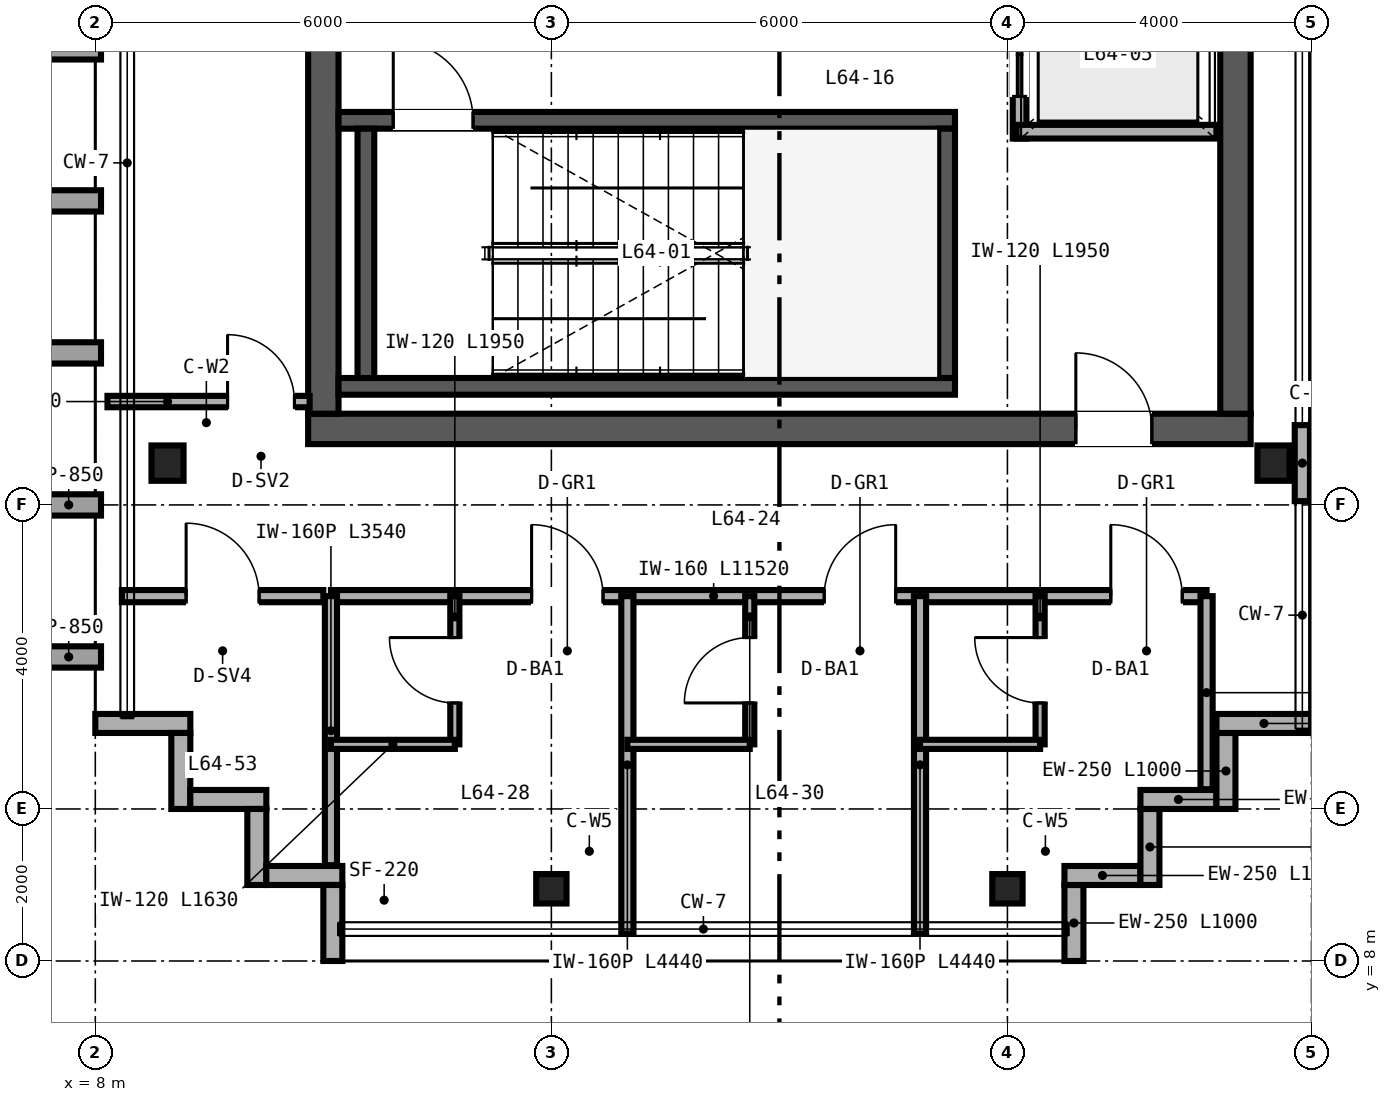
"""IFC4 building model, lengths in metres.
Left out: names, types, materials, properties, quantities, classifications, styles, units other than length and angle.
Written with IfcOpenShell. Run it as: python <this file> out.ifc"""

import sys

from ifc_helpers import new_model, si_unit, direction, frame, frame_2d, origin, origin_2d, place, context, subcontext, project, spatial, rectangle, i_section, extrude, source, transform, mapped, element, fill, save


model = new_model("IFC4")
c1 = context("Model", 3, precision=1e-05, world=origin(), true_north=direction((0.0, 1.0)))
c2 = subcontext(c1, "Body", "Model", "MODEL_VIEW")
j1 = project(units=[si_unit("LENGTHUNIT", "METRE"), si_unit("PLANEANGLEUNIT", "RADIAN")], contexts=[c1])
p1 = place(None, origin())
s1 = spatial("IfcSite", under=j1, at=p1, CompositionType="ELEMENT")
p2 = place(p1, origin())
s2 = spatial("IfcBuilding", under=s1, at=p2, CompositionType="ELEMENT")
p3 = place(p2, frame((0.0, 0.0, 254.4)))
s3 = spatial("IfcBuildingStorey", under=s2, at=p3, CompositionType="ELEMENT", Elevation=254.4)
p4 = place(p3, frame((10.8, 15.0, 0.0), z_axis=(0.0, 0.0, 1.0), x_axis=(1.0, 0.0, 0.0)))
e1 = element("IfcWall", 1, at=p4, inside=s3, PredefinedType="SHEAR", context=c2, shape_type="SweptSolid", body=[
    extrude(rectangle(XDim=12.4, YDim=0.4, at=frame_2d((6.2, 0.0))), origin(), (0.0, 0.0, 1.0), 3.38),
])
p5 = place(p4, frame((10.1, 0.0, 0.0)))
e2 = element("IfcOpeningElement", 2, at=p5, cuts=e1, PredefinedType="OPENING", context=c2, shape_type="SweptSolid", body=[
    extrude(rectangle(XDim=1.0, YDim=2.15, at=frame_2d((0.5, 1.075))), frame((0.0, 0.21, 0.0), z_axis=(0.0, -1.0, 0.0), x_axis=(1.0, 0.0, 0.0)), (0.0, 0.0, 1.0), 0.42),
])
for number, where, z_axis, x_axis in (
    (3, (11.0, 15.2, 0.0), (0.0, 0.0, 1.0), (0.0, 1.0, 0.0)),
    (4, (23.0, 15.2, 0.0), (0.0, 0.0, 1.0), (0.0, 1.0, 0.0)),
):
    element("IfcWall", number, at=place(p3, frame(where, z_axis=z_axis, x_axis=x_axis)), inside=s3, PredefinedType="SHEAR", context=c2, shape_type="SweptSolid", body=[
        extrude(rectangle(XDim=21.6, YDim=0.4, at=frame_2d((10.8, 0.0))), origin(), (0.0, 0.0, 1.0), 3.38),
    ])
p6 = place(p3, frame((11.2, 15.56, 0.0), z_axis=(0.0, 0.0, 1.0), x_axis=(1.0, 0.0, 0.0)))
e5 = element("IfcWall", 5, at=p6, inside=s3, PredefinedType="SHEAR", context=c2, shape_type="SweptSolid", body=[
    extrude(rectangle(XDim=8.11, YDim=0.22, at=frame_2d((4.055, 0.0))), origin(), (0.0, 0.0, 1.0), 3.4),
])
p7 = place(p3, frame((11.2, 19.06, 0.0), z_axis=(0.0, 0.0, 1.0), x_axis=(1.0, 0.0, 0.0)))
e6 = element("IfcWall", 6, at=p7, inside=s3, PredefinedType="SHEAR", context=c2, shape_type="SweptSolid", body=[
    extrude(rectangle(XDim=8.11, YDim=0.22, at=frame_2d((4.055, 0.0))), origin(), (0.0, 0.0, 1.0), 3.4),
])
p8 = place(p7, frame((0.72, 0.0, 0.0)))
e7 = element("IfcOpeningElement", 7, at=p8, cuts=e6, PredefinedType="OPENING", context=c2, shape_type="SweptSolid", body=[
    extrude(rectangle(XDim=1.05, YDim=2.15, at=frame_2d((0.525, 1.075))), frame((0.0, 0.12, 0.0), z_axis=(0.0, -1.0, 0.0), x_axis=(1.0, 0.0, 0.0)), (0.0, 0.0, 1.0), 0.24),
])
for number, where, z_axis, x_axis in (
    (8, (11.56, 15.67, 0.0), (0.0, 0.0, 1.0), (0.0, 1.0, 0.0)),
    (9, (19.2, 15.67, 0.0), (0.0, 0.0, 1.0), (0.0, 1.0, 0.0)),
):
    element("IfcWall", number, at=place(p3, frame(where, z_axis=z_axis, x_axis=x_axis)), inside=s3, PredefinedType="SHEAR", context=c2, shape_type="SweptSolid", body=[
        extrude(rectangle(XDim=3.28, YDim=0.22, at=frame_2d((1.64, 0.0))), origin(), (0.0, 0.0, 1.0), 3.4),
    ])
m1 = source(origin(), c2, "Body", "SweptSolid", [
    extrude(i_section(OverallWidth=0.422, OverallDepth=0.465, WebThickness=0.045, FlangeThickness=0.073, FilletRadius=0.025, at=origin_2d()), origin(), (0.0, 0.0, 1.0), 3.38),
])
for number, where, z_axis, x_axis in (
    (10, (8.95, 14.55, 0.0), (0.0, 0.0, 1.0), (1.0, 0.0, 0.0)),
    (11, (23.5, 14.55, 0.0), (0.0, 0.0, 1.0), (1.0, 0.0, 0.0)),
):
    element("IfcColumn", number, at=place(p3, frame(where, z_axis=z_axis, x_axis=x_axis)), inside=s3, PredefinedType="COLUMN", context=c2, shape_type="MappedRepresentation", body=[
        mapped(m1, transform((0.0, 0.0, 0.0), scale=1.0)),
    ])
m2 = source(origin(), c2, "Body", "SweptSolid", [
    extrude(i_section(OverallWidth=0.399, OverallDepth=0.387, WebThickness=0.021, FlangeThickness=0.033, FilletRadius=0.025, at=origin_2d()), origin(), (0.0, 0.0, 1.0), 3.38),
])
for number, where, z_axis, x_axis in (
    (12, (14.0, 8.95, 0.0), (0.0, 0.0, 1.0), (1.0, 0.0, 0.0)),
    (13, (20.0, 8.95, 0.0), (0.0, 0.0, 1.0), (1.0, 0.0, 0.0)),
):
    element("IfcColumn", number, at=place(p3, frame(where, z_axis=z_axis, x_axis=x_axis)), inside=s3, PredefinedType="COLUMN", context=c2, shape_type="MappedRepresentation", body=[
        mapped(m2, transform((0.0, 0.0, 0.0), scale=1.0)),
    ])
for number, where, z_axis, x_axis in (
    (14, (20.875, 8.0, 0.0), (0.0, 0.0, 1.0), (0.0, 1.0, 0.0)),
    (15, (20.75, 9.125, 0.0), (0.0, 0.0, 1.0), (1.0, 0.0, 0.0)),
    (16, (21.875, 9.0, 0.0), (0.0, 0.0, 1.0), (0.0, 1.0, 0.0)),
    (17, (21.75, 10.125, 0.0), (0.0, 0.0, 1.0), (1.0, 0.0, 0.0)),
    (18, (22.875, 10.0, 0.0), (0.0, 0.0, 1.0), (0.0, 1.0, 0.0)),
):
    element("IfcWall", number, at=place(p3, frame(where, z_axis=z_axis, x_axis=x_axis)), inside=s3, PredefinedType="SOLIDWALL", context=c2, shape_type="SweptSolid", body=[
        extrude(rectangle(XDim=1.0, YDim=0.25, at=frame_2d((0.5, 0.0))), origin(), (0.0, 0.0, 1.0), 3.38),
    ])
for number, where, z_axis, x_axis in (
    (19, (22.75, 11.125, 0.0), (0.0, 0.0, 1.0), (1.0, 0.0, 0.0)),
    (20, (8.0, 11.125, 0.0), (0.0, 0.0, 1.0), (1.0, 0.0, 0.0)),
):
    element("IfcWall", number, at=place(p3, frame(where, z_axis=z_axis, x_axis=x_axis)), inside=s3, PredefinedType="SOLIDWALL", context=c2, shape_type="SweptSolid", body=[
        extrude(rectangle(XDim=1.25, YDim=0.25, at=frame_2d((0.625, 0.0))), origin(), (0.0, 0.0, 1.0), 3.38),
    ])
for number, where, z_axis, x_axis in (
    (21, (9.125, 11.0, 0.0), (0.0, 0.0, 1.0), (0.0, -1.0, 0.0)),
    (22, (9.25, 10.125, 0.0), (0.0, 0.0, 1.0), (1.0, 0.0, 0.0)),
    (23, (10.125, 10.0, 0.0), (0.0, 0.0, 1.0), (0.0, -1.0, 0.0)),
    (24, (10.25, 9.125, 0.0), (0.0, 0.0, 1.0), (1.0, 0.0, 0.0)),
    (25, (11.125, 9.0, 0.0), (0.0, 0.0, 1.0), (0.0, -1.0, 0.0)),
):
    element("IfcWall", number, at=place(p3, frame(where, z_axis=z_axis, x_axis=x_axis)), inside=s3, PredefinedType="SOLIDWALL", context=c2, shape_type="SweptSolid", body=[
        extrude(rectangle(XDim=1.0, YDim=0.25, at=frame_2d((0.5, 0.0))), origin(), (0.0, 0.0, 1.0), 3.38),
    ])
p9 = place(p3, frame((23.88, 14.05, 0.0), z_axis=(0.0, 0.0, 1.0), x_axis=(0.0, 1.0, 0.0)))
e26 = element("IfcWall", 26, at=p9, inside=s3, PredefinedType="PARAPET", context=c2, shape_type="SweptSolid", body=[
    extrude(rectangle(XDim=1.0, YDim=0.2, at=frame_2d((0.5, 0.0))), origin(), (0.0, 0.0, 1.0), 3.38),
])
p10 = place(p3, frame((20.16, 18.82, 0.0), z_axis=(0.0, 0.0, 1.0), x_axis=(0.0, 1.0, 0.0)))
e27 = element("IfcWall", 27, at=p10, inside=s3, PredefinedType="SOLIDWALL", context=c2, shape_type="SweptSolid", body=[
    extrude(rectangle(XDim=6.32, YDim=0.18, at=frame_2d((3.16, 0.0))), origin(), (0.0, 0.0, 1.0), 2.48),
])
p11 = place(p10, frame((0.555, 0.0, 0.0)))
e28 = element("IfcOpeningElement", 28, at=p11, cuts=e27, PredefinedType="OPENING", context=c2, shape_type="SweptSolid", body=[
    extrude(rectangle(XDim=1.1, YDim=2.2, at=frame_2d((0.55, 1.1))), frame((0.0, 0.1, 0.0), z_axis=(0.0, -1.0, 0.0), x_axis=(1.0, 0.0, 0.0)), (0.0, 0.0, 1.0), 0.2),
])
p12 = place(p10, frame((2.635, 0.0, 0.0)))
e29 = element("IfcOpeningElement", 29, at=p12, cuts=e27, PredefinedType="OPENING", context=c2, shape_type="SweptSolid", body=[
    extrude(rectangle(XDim=1.1, YDim=2.2, at=frame_2d((0.55, 1.1))), frame((0.0, 0.1, 0.0), z_axis=(0.0, -1.0, 0.0), x_axis=(1.0, 0.0, 0.0)), (0.0, 0.0, 1.0), 0.2),
])
p13 = place(p10, frame((4.69, 0.0, 0.0)))
e30 = element("IfcOpeningElement", 30, at=p13, cuts=e27, PredefinedType="OPENING", context=c2, shape_type="SweptSolid", body=[
    extrude(rectangle(XDim=1.1, YDim=2.2, at=frame_2d((0.55, 1.1))), frame((0.0, 0.1, 0.0), z_axis=(0.0, -1.0, 0.0), x_axis=(1.0, 0.0, 0.0)), (0.0, 0.0, 1.0), 0.2),
])
p14 = place(p3, frame((20.12, 18.91, 0.0), z_axis=(0.0, 0.0, 1.0), x_axis=(1.0, 0.0, 0.0)))
e31 = element("IfcWall", 31, at=p14, inside=s3, PredefinedType="SOLIDWALL", context=c2, shape_type="SweptSolid", body=[
    extrude(rectangle(XDim=2.63, YDim=0.18, at=frame_2d((1.315, 0.0))), origin(), (0.0, 0.0, 1.0), 3.38),
])
p15 = place(p3, frame((11.1, 12.8, 0.0), z_axis=(0.0, 0.0, 1.0), x_axis=(1.0, 0.0, 0.0)))
e32 = element("IfcWall", 32, at=p15, inside=s3, PredefinedType="PARTITIONING", context=c2, shape_type="SweptSolid", body=[
    extrude(rectangle(XDim=11.52, YDim=0.16, at=frame_2d((5.76, 0.0))), origin(), (0.0, 0.0, 1.0), 3.38),
])
p16 = place(p15, frame((2.64, 0.0, 0.0)))
e33 = element("IfcOpeningElement", 33, at=p16, cuts=e32, PredefinedType="OPENING", context=c2, shape_type="SweptSolid", body=[
    extrude(rectangle(XDim=0.94, YDim=2.15, at=frame_2d((0.47, 1.075))), frame((0.0, 0.09, 0.0), z_axis=(0.0, -1.0, 0.0), x_axis=(1.0, 0.0, 0.0)), (0.0, 0.0, 1.0), 0.18),
])
p17 = place(p15, frame((6.49, 0.0, 0.0)))
e34 = element("IfcOpeningElement", 34, at=p17, cuts=e32, PredefinedType="OPENING", context=c2, shape_type="SweptSolid", body=[
    extrude(rectangle(XDim=0.94, YDim=2.15, at=frame_2d((0.47, 1.075))), frame((0.0, 0.09, 0.0), z_axis=(0.0, -1.0, 0.0), x_axis=(1.0, 0.0, 0.0)), (0.0, 0.0, 1.0), 0.18),
])
p18 = place(p15, frame((10.26, 0.0, 0.0)))
e35 = element("IfcOpeningElement", 35, at=p18, cuts=e32, PredefinedType="OPENING", context=c2, shape_type="SweptSolid", body=[
    extrude(rectangle(XDim=0.94, YDim=2.15, at=frame_2d((0.47, 1.075))), frame((0.0, 0.09, 0.0), z_axis=(0.0, -1.0, 0.0), x_axis=(1.0, 0.0, 0.0)), (0.0, 0.0, 1.0), 0.18),
])
p19 = place(p3, frame((11.1, 9.26, 0.0), z_axis=(0.0, 0.0, 1.0), x_axis=(0.0, 1.0, 0.0)))
e36 = element("IfcWall", 36, at=p19, inside=s3, PredefinedType="PARTITIONING", context=c2, shape_type="SweptSolid", body=[
    extrude(rectangle(XDim=3.54, YDim=0.16, at=frame_2d((1.77, 0.0))), origin(), (0.0, 0.0, 1.0), 3.38),
])
p20 = place(p3, frame((22.62, 10.26, 0.0), z_axis=(0.0, 0.0, 1.0), x_axis=(0.0, 1.0, 0.0)))
e37 = element("IfcWall", 37, at=p20, inside=s3, PredefinedType="PARTITIONING", context=c2, shape_type="SweptSolid", body=[
    extrude(rectangle(XDim=2.54, YDim=0.16, at=frame_2d((1.27, 0.0))), origin(), (0.0, 0.0, 1.0), 3.38),
])
p21 = place(p3, frame((15.0, 8.36, 0.0), z_axis=(0.0, 0.0, 1.0), x_axis=(0.0, 1.0, 0.0)))
e38 = element("IfcWall", 38, at=p21, inside=s3, PredefinedType="PARTITIONING", context=c2, shape_type="SweptSolid", body=[
    extrude(rectangle(XDim=4.44, YDim=0.16, at=frame_2d((2.22, 0.0))), origin(), (0.0, 0.0, 1.0), 2.687),
])
p22 = place(p3, frame((12.73, 10.85, 0.0), z_axis=(0.0, 0.0, 1.0), x_axis=(0.0, 1.0, 0.0)))
e39 = element("IfcWall", 39, at=p22, inside=s3, PredefinedType="PARTITIONING", context=c2, shape_type="SweptSolid", body=[
    extrude(rectangle(XDim=1.95, YDim=0.12, at=frame_2d((0.975, 0.0))), origin(), (0.0, 0.0, 1.0), 3.38),
])
p23 = place(p22, frame((0.545, 0.0, 0.0)))
e40 = element("IfcOpeningElement", 40, at=p23, cuts=e39, PredefinedType="OPENING", context=c2, shape_type="SweptSolid", body=[
    extrude(rectangle(XDim=0.86, YDim=2.1, at=frame_2d((0.43, 1.05))), frame((0.0, 0.07, 0.0), z_axis=(0.0, -1.0, 0.0), x_axis=(1.0, 0.0, 0.0)), (0.0, 0.0, 1.0), 0.14),
])
p24 = place(p3, frame((11.1, 10.85, 0.0), z_axis=(0.0, 0.0, 1.0), x_axis=(1.0, 0.0, 0.0)))
e41 = element("IfcWall", 41, at=p24, inside=s3, PredefinedType="PARTITIONING", context=c2, shape_type="SweptSolid", body=[
    extrude(rectangle(XDim=1.63, YDim=0.12, at=frame_2d((0.815, 0.0))), origin(), (0.0, 0.0, 1.0), 3.38),
])
p25 = place(p3, frame((18.85, 8.36, 0.0), z_axis=(0.0, 0.0, 1.0), x_axis=(0.0, 1.0, 0.0)))
e42 = element("IfcWall", 42, at=p25, inside=s3, PredefinedType="PARTITIONING", context=c2, shape_type="SweptSolid", body=[
    extrude(rectangle(XDim=4.44, YDim=0.16, at=frame_2d((2.22, 0.0))), origin(), (0.0, 0.0, 1.0), 2.687),
])
p26 = place(p3, frame((16.61, 10.85, 0.0), z_axis=(0.0, 0.0, 1.0), x_axis=(0.0, 1.0, 0.0)))
e43 = element("IfcWall", 43, at=p26, inside=s3, PredefinedType="PARTITIONING", context=c2, shape_type="SweptSolid", body=[
    extrude(rectangle(XDim=1.95, YDim=0.12, at=frame_2d((0.975, 0.0))), origin(), (0.0, 0.0, 1.0), 3.38),
])
p27 = place(p26, frame((0.545, 0.0, 0.0)))
e44 = element("IfcOpeningElement", 44, at=p27, cuts=e43, PredefinedType="OPENING", context=c2, shape_type="SweptSolid", body=[
    extrude(rectangle(XDim=0.86, YDim=2.1, at=frame_2d((0.43, 1.05))), frame((0.0, 0.07, 0.0), z_axis=(0.0, -1.0, 0.0), x_axis=(1.0, 0.0, 0.0)), (0.0, 0.0, 1.0), 0.14),
])
p28 = place(p3, frame((15.0, 10.85, 0.0), z_axis=(0.0, 0.0, 1.0), x_axis=(1.0, 0.0, 0.0)))
e45 = element("IfcWall", 45, at=p28, inside=s3, PredefinedType="PARTITIONING", context=c2, shape_type="SweptSolid", body=[
    extrude(rectangle(XDim=1.61, YDim=0.12, at=frame_2d((0.805, 0.0))), origin(), (0.0, 0.0, 1.0), 3.38),
])
p29 = place(p3, frame((20.43, 10.85, 0.0), z_axis=(0.0, 0.0, 1.0), x_axis=(0.0, 1.0, 0.0)))
e46 = element("IfcWall", 46, at=p29, inside=s3, PredefinedType="PARTITIONING", context=c2, shape_type="SweptSolid", body=[
    extrude(rectangle(XDim=1.95, YDim=0.12, at=frame_2d((0.975, 0.0))), origin(), (0.0, 0.0, 1.0), 3.38),
])
p30 = place(p29, frame((0.545, 0.0, 0.0)))
e47 = element("IfcOpeningElement", 47, at=p30, cuts=e46, PredefinedType="OPENING", context=c2, shape_type="SweptSolid", body=[
    extrude(rectangle(XDim=0.86, YDim=2.1, at=frame_2d((0.43, 1.05))), frame((0.0, 0.07, 0.0), z_axis=(0.0, -1.0, 0.0), x_axis=(1.0, 0.0, 0.0)), (0.0, 0.0, 1.0), 0.14),
])
p31 = place(p3, frame((18.85, 10.85, 0.0), z_axis=(0.0, 0.0, 1.0), x_axis=(1.0, 0.0, 0.0)))
e48 = element("IfcWall", 48, at=p31, inside=s3, PredefinedType="PARTITIONING", context=c2, shape_type="SweptSolid", body=[
    extrude(rectangle(XDim=1.58, YDim=0.12, at=frame_2d((0.79, 0.0))), origin(), (0.0, 0.0, 1.0), 3.38),
])
p32 = place(p3, frame((8.16, 15.36, 0.0), z_axis=(0.0, 0.0, 1.0), x_axis=(1.0, 0.0, 0.0)))
e49 = element("IfcWall", 49, at=p32, inside=s3, PredefinedType="PARTITIONING", context=c2, shape_type="SweptSolid", body=[
    extrude(rectangle(XDim=2.66, YDim=0.15, at=frame_2d((1.33, 0.0))), origin(), (0.0, 0.0, 1.0), 2.601),
])
p33 = place(p32, frame((1.58, 0.0, 0.0)))
e50 = element("IfcOpeningElement", 50, at=p33, cuts=e49, PredefinedType="OPENING", context=c2, shape_type="SweptSolid", body=[
    extrude(rectangle(XDim=0.88, YDim=2.15, at=frame_2d((0.44, 1.075))), frame((0.0, 0.085, 0.0), z_axis=(0.0, -1.0, 0.0), x_axis=(1.0, 0.0, 0.0)), (0.0, 0.0, 1.0), 0.17),
])
p34 = place(p3, frame((8.35, 12.8, 0.0), z_axis=(0.0, 0.0, 1.0), x_axis=(1.0, 0.0, 0.0)))
e51 = element("IfcWall", 51, at=p34, inside=s3, PredefinedType="PARTITIONING", context=c2, shape_type="SweptSolid", body=[
    extrude(rectangle(XDim=2.65, YDim=0.16, at=frame_2d((1.325, 0.0))), origin(), (0.0, 0.0, 1.0), 3.38),
])
p35 = place(p34, frame((0.845, 0.0, 0.0)))
e52 = element("IfcOpeningElement", 52, at=p35, cuts=e51, PredefinedType="OPENING", context=c2, shape_type="SweptSolid", body=[
    extrude(rectangle(XDim=0.96, YDim=2.15, at=frame_2d((0.48, 1.075))), frame((0.0, 0.09, 0.0), z_axis=(0.0, -1.0, 0.0), x_axis=(1.0, 0.0, 0.0)), (0.0, 0.0, 1.0), 0.18),
])
m3 = source(origin(), c2, "Body", "SweptSolid", [
    extrude(rectangle(XDim=1.05, YDim=2.15, at=frame_2d((0.525, 1.075))), frame((0.0, 0.025, 0.0), z_axis=(0.0, -1.0, 0.0), x_axis=(1.0, 0.0, 0.0)), (0.0, 0.0, 1.0), 0.05),
])
p36 = place(p8, origin())
e53 = element("IfcDoor", 53, at=p36, inside=s3, OperationType="SINGLE_SWING_LEFT", PredefinedType="DOOR", context=c2, shape_type="MappedRepresentation", body=[
    mapped(m3, transform((0.0, 0.0, 0.0), scale=1.0)),
])
fill(e7, e53)
m4 = source(origin(), c2, "Body", "SweptSolid", [
    extrude(rectangle(XDim=1.1, YDim=2.2, at=frame_2d((0.55, 1.1))), frame((0.0, 0.025, 0.0), z_axis=(0.0, -1.0, 0.0), x_axis=(1.0, 0.0, 0.0)), (0.0, 0.0, 1.0), 0.05),
])
p37 = place(p11, origin())
e54 = element("IfcDoor", 54, at=p37, inside=s3, OperationType="DOUBLE_DOOR_SLIDING", PredefinedType="DOOR", context=c2, shape_type="MappedRepresentation", body=[
    mapped(m4, transform((0.0, 0.0, 0.0), scale=1.0)),
])
fill(e28, e54)
m5 = source(origin(), c2, "Body", "SweptSolid", [
    extrude(rectangle(XDim=1.0, YDim=2.15, at=frame_2d((0.5, 1.075))), frame((0.0, 0.025, 0.0), z_axis=(0.0, -1.0, 0.0), x_axis=(1.0, 0.0, 0.0)), (0.0, 0.0, 1.0), 0.05),
])
p38 = place(p5, origin())
e55 = element("IfcDoor", 55, at=p38, inside=s3, OperationType="SINGLE_SWING_LEFT", PredefinedType="DOOR", context=c2, shape_type="MappedRepresentation", body=[
    mapped(m5, transform((0.0, 0.0, 0.0), scale=1.0)),
])
fill(e2, e55)
m6 = source(origin(), c2, "Body", "SweptSolid", [
    extrude(rectangle(XDim=0.86, YDim=2.1, at=frame_2d((0.43, 1.05))), frame((0.0, 0.025, 0.0), z_axis=(0.0, -1.0, 0.0), x_axis=(1.0, 0.0, 0.0)), (0.0, 0.0, 1.0), 0.05),
])
p39 = place(p23, origin())
e56 = element("IfcDoor", 56, at=p39, inside=s3, OperationType="SINGLE_SWING_RIGHT", PredefinedType="DOOR", context=c2, shape_type="MappedRepresentation", body=[
    mapped(m6, transform((0.0, 0.0, 0.0), scale=1.0)),
])
fill(e40, e56)
p40 = place(p27, origin())
e57 = element("IfcDoor", 57, at=p40, inside=s3, OperationType="SINGLE_SWING_LEFT", PredefinedType="DOOR", context=c2, shape_type="MappedRepresentation", body=[
    mapped(m6, transform((0.0, 0.0, 0.0), scale=1.0)),
])
fill(e44, e57)
p41 = place(p30, origin())
e58 = element("IfcDoor", 58, at=p41, inside=s3, OperationType="SINGLE_SWING_RIGHT", PredefinedType="DOOR", context=c2, shape_type="MappedRepresentation", body=[
    mapped(m6, transform((0.0, 0.0, 0.0), scale=1.0)),
])
fill(e47, e58)
m7 = source(origin(), c2, "Body", "SweptSolid", [
    extrude(rectangle(XDim=0.94, YDim=2.15, at=frame_2d((0.47, 1.075))), frame((0.0, 0.025, 0.0), z_axis=(0.0, -1.0, 0.0), x_axis=(1.0, 0.0, 0.0)), (0.0, 0.0, 1.0), 0.05),
])
p42 = place(p16, origin())
e59 = element("IfcDoor", 59, at=p42, inside=s3, OperationType="SINGLE_SWING_LEFT", PredefinedType="DOOR", context=c2, shape_type="MappedRepresentation", body=[
    mapped(m7, transform((0.0, 0.0, 0.0), scale=1.0)),
])
fill(e33, e59)
p43 = place(p17, origin())
e60 = element("IfcDoor", 60, at=p43, inside=s3, OperationType="SINGLE_SWING_RIGHT", PredefinedType="DOOR", context=c2, shape_type="MappedRepresentation", body=[
    mapped(m7, transform((0.0, 0.0, 0.0), scale=1.0)),
])
fill(e34, e60)
p44 = place(p18, origin())
e61 = element("IfcDoor", 61, at=p44, inside=s3, OperationType="SINGLE_SWING_LEFT", PredefinedType="DOOR", context=c2, shape_type="MappedRepresentation", body=[
    mapped(m7, transform((0.0, 0.0, 0.0), scale=1.0)),
])
fill(e35, e61)
m8 = source(origin(), c2, "Body", "SweptSolid", [
    extrude(rectangle(XDim=0.88, YDim=2.15, at=frame_2d((0.44, 1.075))), frame((0.0, 0.025, 0.0), z_axis=(0.0, -1.0, 0.0), x_axis=(1.0, 0.0, 0.0)), (0.0, 0.0, 1.0), 0.05),
])
p45 = place(p33, origin())
e62 = element("IfcDoor", 62, at=p45, inside=s3, OperationType="SINGLE_SWING_LEFT", PredefinedType="DOOR", context=c2, shape_type="MappedRepresentation", body=[
    mapped(m8, transform((0.0, 0.0, 0.0), scale=1.0)),
])
fill(e50, e62)
m9 = source(origin(), c2, "Body", "SweptSolid", [
    extrude(rectangle(XDim=0.96, YDim=2.15, at=frame_2d((0.48, 1.075))), frame((0.0, 0.025, 0.0), z_axis=(0.0, -1.0, 0.0), x_axis=(1.0, 0.0, 0.0)), (0.0, 0.0, 1.0), 0.05),
])
p46 = place(p35, origin())
e63 = element("IfcDoor", 63, at=p46, inside=s3, OperationType="SINGLE_SWING_LEFT", PredefinedType="DOOR", context=c2, shape_type="MappedRepresentation", body=[
    mapped(m9, transform((0.0, 0.0, 0.0), scale=1.0)),
])
fill(e52, e63)
save(model, sys.argv[1])
